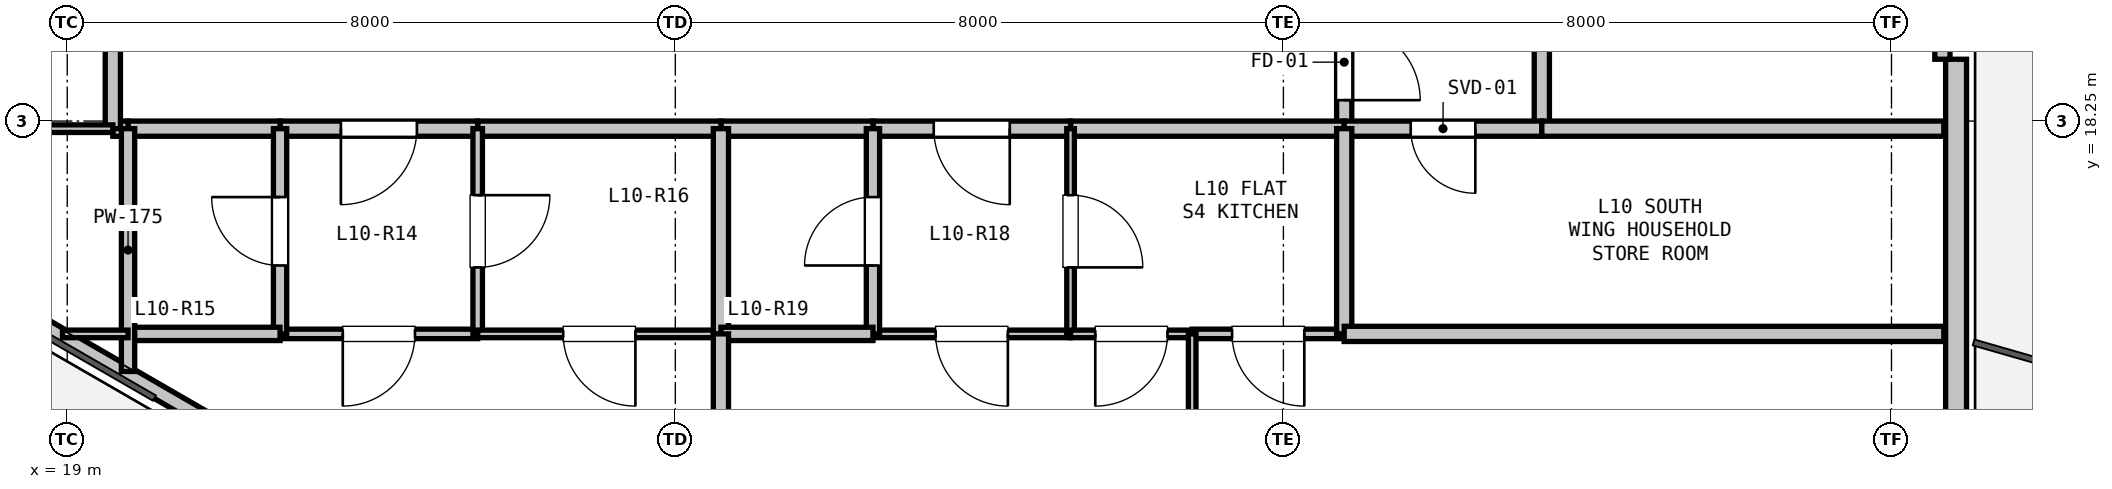
"""IFC4 building model, lengths in metres.
Left out: names, types, materials, properties, quantities, classifications, styles, units other than length and angle.
Written with IfcOpenShell. Run it as: python <this file> out.ifc"""

import sys

from ifc_helpers import new_model, si_unit, direction, frame, frame_2d, origin, place, context, subcontext, project, spatial, rectangle, extrude, element, fill, save


model = new_model("IFC4")
c1 = context("Model", 3, precision=1e-05, world=origin(), true_north=direction((0.0, 1.0)))
c2 = subcontext(c1, "Body", "Model", "MODEL_VIEW")
j1 = project(units=[si_unit("LENGTHUNIT", "METRE"), si_unit("PLANEANGLEUNIT", "RADIAN")], contexts=[c1])
p1 = place(None, origin())
s1 = spatial("IfcSite", under=j1, at=p1, CompositionType="ELEMENT")
p2 = place(p1, origin())
s2 = spatial("IfcBuilding", under=s1, at=p2, CompositionType="ELEMENT")
p3 = place(p2, frame((0.0, 0.0, 39.0)))
s3 = spatial("IfcBuildingStorey", under=s2, at=p3, CompositionType="ELEMENT", Elevation=39.0)
p4 = place(p3, frame((43.85, 19.063, 0.0), z_axis=(0.0, 0.0, 1.0), x_axis=(0.0, -1.0, 0.0)))
e1 = element("IfcWall", 1, at=p4, inside=s3, PredefinedType="SOLIDWALL", context=c2, shape_type="SweptSolid", body=[
    extrude(rectangle(XDim=12.673, YDim=0.275, at=frame_2d((6.336, 0.0))), origin(), (0.0, 0.0, 1.0), 2.66),
])
p5 = place(p3, frame((43.67, 20.763, 0.0), z_axis=(0.0, 0.0, 1.0), x_axis=(0.0, -1.0, 0.0)))
e2 = element("IfcWall", 2, at=p5, inside=s3, PredefinedType="PARAPET", context=c2, shape_type="SweptSolid", body=[
    extrude(rectangle(XDim=1.7, YDim=0.2, at=frame_2d((0.85, 0.0))), origin(), (0.0, 0.0, 1.0), 2.66),
])
p6 = place(p3, frame((26.76, 10.896, 0.0), z_axis=(0.0, 0.0, 1.0), x_axis=(-0.866027351828, 0.499996625875, 0.0)))
e3 = element("IfcWall", 3, at=p6, inside=s3, PredefinedType="PARAPET", context=c2, shape_type="SweptSolid", body=[
    extrude(rectangle(XDim=11.973, YDim=0.2, at=frame_2d((5.987, 0.0))), origin(), (0.0, 0.0, 1.0), 0.2),
])
p7 = place(p3, frame((35.8, 19.9, 0.0), z_axis=(0.0, 0.0, 1.0), x_axis=(0.0, -1.0, 0.0)))
e4 = element("IfcWall", 4, at=p7, inside=s3, PredefinedType="PARTITIONING", context=c2, shape_type="SweptSolid", body=[
    extrude(rectangle(XDim=1.75, YDim=0.2, at=frame_2d((0.875, 0.0))), origin(), (0.0, 0.0, 1.0), 3.04),
])
p8 = place(p7, frame((0.375, 0.0, 0.0)))
e5 = element("IfcOpeningElement", 5, at=p8, cuts=e4, PredefinedType="OPENING", context=c2, shape_type="SweptSolid", body=[
    extrude(rectangle(XDim=1.0, YDim=2.15, at=frame_2d((0.5, 1.075))), frame((0.0, 0.11, 0.0), z_axis=(0.0, -1.0, 0.0), x_axis=(1.0, 0.0, 0.0)), (0.0, 0.0, 1.0), 0.22),
])
p9 = place(p3, frame((35.8, 18.15, 0.0), z_axis=(0.0, 0.0, 1.0), x_axis=(-1.0, 0.0, 0.0)))
e6 = element("IfcWall", 6, at=p9, inside=s3, PredefinedType="PARTITIONING", context=c2, shape_type="SweptSolid", body=[
    extrude(rectangle(XDim=3.6, YDim=0.2, at=frame_2d((1.8, 0.0))), origin(), (0.0, 0.0, 1.0), 3.04),
])
p10 = place(p3, frame((32.2, 18.15, 0.0), z_axis=(0.0, 0.0, 1.0), x_axis=(-1.0, 0.0, 0.0)))
e7 = element("IfcWall", 7, at=p10, inside=s3, PredefinedType="PARTITIONING", context=c2, shape_type="SweptSolid", body=[
    extrude(rectangle(XDim=2.6, YDim=0.2, at=frame_2d((1.3, 0.0))), origin(), (0.0, 0.0, 1.0), 3.04),
])
p11 = place(p10, frame((0.8, 0.0, 0.0)))
e8 = element("IfcOpeningElement", 8, at=p11, cuts=e7, PredefinedType="OPENING", context=c2, shape_type="SweptSolid", body=[
    extrude(rectangle(XDim=1.0, YDim=2.15, at=frame_2d((0.5, 1.075))), frame((0.0, 0.11, 0.0), z_axis=(0.0, -1.0, 0.0), x_axis=(1.0, 0.0, 0.0)), (0.0, 0.0, 1.0), 0.22),
])
p12 = place(p3, frame((29.6, 18.15, 0.0), z_axis=(0.0, 0.0, 1.0), x_axis=(-1.0, 0.0, 0.0)))
e9 = element("IfcWall", 9, at=p12, inside=s3, PredefinedType="PARTITIONING", context=c2, shape_type="SweptSolid", body=[
    extrude(rectangle(XDim=2.0, YDim=0.2, at=frame_2d((1.0, 0.0))), origin(), (0.0, 0.0, 1.0), 3.04),
])
p13 = place(p3, frame((27.6, 18.15, 0.0), z_axis=(0.0, 0.0, 1.0), x_axis=(-1.0, 0.0, 0.0)))
e10 = element("IfcWall", 10, at=p13, inside=s3, PredefinedType="PARTITIONING", context=c2, shape_type="SweptSolid", body=[
    extrude(rectangle(XDim=3.2, YDim=0.2, at=frame_2d((1.6, 0.0))), origin(), (0.0, 0.0, 1.0), 3.04),
])
p14 = place(p3, frame((24.4, 18.15, 0.0), z_axis=(0.0, 0.0, 1.0), x_axis=(-1.0, 0.0, 0.0)))
e11 = element("IfcWall", 11, at=p14, inside=s3, PredefinedType="PARTITIONING", context=c2, shape_type="SweptSolid", body=[
    extrude(rectangle(XDim=2.6, YDim=0.2, at=frame_2d((1.3, 0.0))), origin(), (0.0, 0.0, 1.0), 2.337),
])
p15 = place(p14, frame((0.8, 0.0, 0.0)))
e12 = element("IfcOpeningElement", 12, at=p15, cuts=e11, PredefinedType="OPENING", context=c2, shape_type="SweptSolid", body=[
    extrude(rectangle(XDim=1.0, YDim=2.15, at=frame_2d((0.5, 1.075))), frame((0.0, 0.11, 0.0), z_axis=(0.0, -1.0, 0.0), x_axis=(1.0, 0.0, 0.0)), (0.0, 0.0, 1.0), 0.22),
])
p16 = place(p3, frame((21.8, 18.15, 0.0), z_axis=(0.0, 0.0, 1.0), x_axis=(-1.0, 0.0, 0.0)))
e13 = element("IfcWall", 13, at=p16, inside=s3, PredefinedType="PARTITIONING", context=c2, shape_type="SweptSolid", body=[
    extrude(rectangle(XDim=2.0, YDim=0.2, at=frame_2d((1.0, 0.0))), origin(), (0.0, 0.0, 1.0), 3.04),
])
p17 = place(p3, frame((19.8, 18.15, 0.0), z_axis=(0.0, 0.0, 1.0), x_axis=(-1.0, 0.0, 0.0)))
e14 = element("IfcWall", 14, at=p17, inside=s3, PredefinedType="PARTITIONING", context=c2, shape_type="SweptSolid", body=[
    extrude(rectangle(XDim=0.2, YDim=0.2, at=frame_2d((0.1, 0.0))), origin(), (0.0, 0.0, 1.0), 3.04),
])
p18 = place(p3, frame((19.6, 18.15, 0.0), z_axis=(0.0, 0.0, 1.0), x_axis=(0.0, 1.0, 0.0)))
e15 = element("IfcWall", 15, at=p18, inside=s3, PredefinedType="PARTITIONING", context=c2, shape_type="SweptSolid", body=[
    extrude(rectangle(XDim=3.9, YDim=0.2, at=frame_2d((1.95, 0.0))), origin(), (0.0, 0.0, 1.0), 2.337),
])
p19 = place(p3, frame((38.4, 21.4, 0.0), z_axis=(0.0, 0.0, 1.0), x_axis=(0.0, -1.0, 0.0)))
e16 = element("IfcWall", 16, at=p19, inside=s3, PredefinedType="PARTITIONING", context=c2, shape_type="SweptSolid", body=[
    extrude(rectangle(XDim=3.25, YDim=0.2, at=frame_2d((1.625, 0.0))), origin(), (0.0, 0.0, 1.0), 3.04),
])
p20 = place(p3, frame((38.4, 18.15, 0.0), z_axis=(0.0, 0.0, 1.0), x_axis=(-1.0, 0.0, 0.0)))
e17 = element("IfcWall", 17, at=p20, inside=s3, PredefinedType="PARTITIONING", context=c2, shape_type="SweptSolid", body=[
    extrude(rectangle(XDim=2.6, YDim=0.2, at=frame_2d((1.3, 0.0))), origin(), (0.0, 0.0, 1.0), 2.337),
])
p21 = place(p20, frame((0.875, 0.0, 0.0)))
e18 = element("IfcOpeningElement", 18, at=p21, cuts=e17, PredefinedType="OPENING", context=c2, shape_type="SweptSolid", body=[
    extrude(rectangle(XDim=0.85, YDim=2.1, at=frame_2d((0.425, 1.05))), frame((0.0, 0.11, 0.0), z_axis=(0.0, -1.0, 0.0), x_axis=(1.0, 0.0, 0.0)), (0.0, 0.0, 1.0), 0.22),
])
p22 = place(p3, frame((24.4, 15.45, 0.0), z_axis=(0.0, 0.0, 1.0), x_axis=(-1.0, 0.0, 0.0)))
e19 = element("IfcWall", 19, at=p22, inside=s3, PredefinedType="PARTITIONING", context=c2, shape_type="SweptSolid", body=[
    extrude(rectangle(XDim=2.6, YDim=0.125, at=frame_2d((1.3, 0.0))), origin(), (0.0, 0.0, 1.0), 3.04),
])
p23 = place(p22, frame((0.825, 0.0, 0.0)))
e20 = element("IfcOpeningElement", 20, at=p23, cuts=e19, PredefinedType="OPENING", context=c2, shape_type="SweptSolid", body=[
    extrude(rectangle(XDim=0.95, YDim=2.1, at=frame_2d((0.475, 1.05))), frame((0.0, 0.073, 0.0), z_axis=(0.0, -1.0, 0.0), x_axis=(1.0, 0.0, 0.0)), (0.0, 0.0, 1.0), 0.145),
])
p24 = place(p3, frame((21.8, 15.45, 0.0), z_axis=(0.0, 0.0, 1.0), x_axis=(0.0, 1.0, 0.0)))
e21 = element("IfcWall", 21, at=p24, inside=s3, PredefinedType="PLUMBINGWALL", context=c2, shape_type="SweptSolid", body=[
    extrude(rectangle(XDim=2.7, YDim=0.175, at=frame_2d((1.35, 0.0))), origin(), (0.0, 0.0, 1.0), 3.04),
])
p25 = place(p24, frame((0.9, 0.0, 0.0)))
e22 = element("IfcOpeningElement", 22, at=p25, cuts=e21, PredefinedType="OPENING", context=c2, shape_type="SweptSolid", body=[
    extrude(rectangle(XDim=0.9, YDim=2.1, at=frame_2d((0.45, 1.05))), frame((0.0, 0.097, 0.0), z_axis=(0.0, -1.0, 0.0), x_axis=(1.0, 0.0, 0.0)), (0.0, 0.0, 1.0), 0.195),
])
p26 = place(p3, frame((24.4, 18.15, 0.0), z_axis=(0.0, 0.0, 1.0), x_axis=(0.0, -1.0, 0.0)))
e23 = element("IfcWall", 23, at=p26, inside=s3, PredefinedType="PARTITIONING", context=c2, shape_type="SweptSolid", body=[
    extrude(rectangle(XDim=2.7, YDim=0.125, at=frame_2d((1.35, 0.0))), origin(), (0.0, 0.0, 1.0), 2.337),
])
p27 = place(p26, frame((0.875, 0.0, 0.0)))
e24 = element("IfcOpeningElement", 24, at=p27, cuts=e23, PredefinedType="OPENING", context=c2, shape_type="SweptSolid", body=[
    extrude(rectangle(XDim=0.95, YDim=2.1, at=frame_2d((0.475, 1.05))), frame((0.0, 0.073, 0.0), z_axis=(0.0, -1.0, 0.0), x_axis=(1.0, 0.0, 0.0)), (0.0, 0.0, 1.0), 0.145),
])
p28 = place(p3, frame((32.2, 15.45, 0.0), z_axis=(0.0, 0.0, 1.0), x_axis=(-1.0, 0.0, 0.0)))
e25 = element("IfcWall", 25, at=p28, inside=s3, PredefinedType="PARTITIONING", context=c2, shape_type="SweptSolid", body=[
    extrude(rectangle(XDim=2.6, YDim=0.1, at=frame_2d((1.3, 0.0))), origin(), (0.0, 0.0, 1.0), 3.04),
])
p29 = place(p28, frame((0.825, 0.0, 0.0)))
e26 = element("IfcOpeningElement", 26, at=p29, cuts=e25, PredefinedType="OPENING", context=c2, shape_type="SweptSolid", body=[
    extrude(rectangle(XDim=0.95, YDim=2.1, at=frame_2d((0.475, 1.05))), frame((0.0, 0.06, 0.0), z_axis=(0.0, -1.0, 0.0), x_axis=(1.0, 0.0, 0.0)), (0.0, 0.0, 1.0), 0.12),
])
p30 = place(p3, frame((29.6, 15.45, 0.0), z_axis=(0.0, 0.0, 1.0), x_axis=(0.0, 1.0, 0.0)))
e27 = element("IfcWall", 27, at=p30, inside=s3, PredefinedType="PLUMBINGWALL", context=c2, shape_type="SweptSolid", body=[
    extrude(rectangle(XDim=2.7, YDim=0.175, at=frame_2d((1.35, 0.0))), origin(), (0.0, 0.0, 1.0), 3.04),
])
p31 = place(p30, frame((0.9, 0.0, 0.0)))
e28 = element("IfcOpeningElement", 28, at=p31, cuts=e27, PredefinedType="OPENING", context=c2, shape_type="SweptSolid", body=[
    extrude(rectangle(XDim=0.9, YDim=2.1, at=frame_2d((0.45, 1.05))), frame((0.0, 0.097, 0.0), z_axis=(0.0, -1.0, 0.0), x_axis=(1.0, 0.0, 0.0)), (0.0, 0.0, 1.0), 0.195),
])
p32 = place(p3, frame((32.2, 18.15, 0.0), z_axis=(0.0, 0.0, 1.0), x_axis=(0.0, -1.0, 0.0)))
e29 = element("IfcWall", 29, at=p32, inside=s3, PredefinedType="PARTITIONING", context=c2, shape_type="SweptSolid", body=[
    extrude(rectangle(XDim=2.7, YDim=0.1, at=frame_2d((1.35, 0.0))), origin(), (0.0, 0.0, 1.0), 3.04),
])
p33 = place(p32, frame((0.875, 0.0, 0.0)))
e30 = element("IfcOpeningElement", 30, at=p33, cuts=e29, PredefinedType="OPENING", context=c2, shape_type="SweptSolid", body=[
    extrude(rectangle(XDim=0.95, YDim=2.1, at=frame_2d((0.475, 1.05))), frame((0.0, 0.06, 0.0), z_axis=(0.0, -1.0, 0.0), x_axis=(1.0, 0.0, 0.0)), (0.0, 0.0, 1.0), 0.12),
])
p34 = place(p3, frame((21.8, 15.45, 0.0), z_axis=(0.0, 0.0, 1.0), x_axis=(-1.0, 0.0, 0.0)))
e31 = element("IfcWall", 31, at=p34, inside=s3, PredefinedType="PLUMBINGWALL", context=c2, shape_type="SweptSolid", body=[
    extrude(rectangle(XDim=2.0, YDim=0.175, at=frame_2d((1.0, 0.0))), origin(), (0.0, 0.0, 1.0), 2.365),
])
p35 = place(p3, frame((19.8, 14.956, 0.0), z_axis=(0.0, 0.0, 1.0), x_axis=(0.0, 1.0, 0.0)))
e32 = element("IfcWall", 32, at=p35, inside=s3, PredefinedType="PLUMBINGWALL", context=c2, shape_type="SweptSolid", body=[
    extrude(rectangle(XDim=3.194, YDim=0.175, at=frame_2d((1.597, 0.0))), origin(), (0.0, 0.0, 1.0), 2.365),
])
p36 = place(p3, frame((27.6, 15.45, 0.0), z_axis=(0.0, 0.0, 1.0), x_axis=(-1.0, 0.0, 0.0)))
e33 = element("IfcWall", 33, at=p36, inside=s3, PredefinedType="PARTITIONING", context=c2, shape_type="SweptSolid", body=[
    extrude(rectangle(XDim=3.2, YDim=0.1, at=frame_2d((1.6, 0.0))), origin(), (0.0, 0.0, 1.0), 2.337),
])
p37 = place(p36, frame((1.125, 0.0, 0.0)))
e34 = element("IfcOpeningElement", 34, at=p37, cuts=e33, PredefinedType="OPENING", context=c2, shape_type="SweptSolid", body=[
    extrude(rectangle(XDim=0.95, YDim=2.1, at=frame_2d((0.475, 1.05))), frame((0.0, 0.06, 0.0), z_axis=(0.0, -1.0, 0.0), x_axis=(1.0, 0.0, 0.0)), (0.0, 0.0, 1.0), 0.12),
])
p38 = place(p3, frame((27.6, 18.15, 0.0), z_axis=(0.0, 0.0, 1.0), x_axis=(0.0, -1.0, 0.0)))
e35 = element("IfcWall", 35, at=p38, inside=s3, PredefinedType="PARTITIONING", context=c2, shape_type="SweptSolid", body=[
    extrude(rectangle(XDim=2.7, YDim=0.2, at=frame_2d((1.35, 0.0))), origin(), (0.0, 0.0, 1.0), 3.04),
])
p39 = place(p3, frame((29.6, 15.45, 0.0), z_axis=(0.0, 0.0, 1.0), x_axis=(-1.0, 0.0, 0.0)))
e36 = element("IfcWall", 36, at=p39, inside=s3, PredefinedType="PLUMBINGWALL", context=c2, shape_type="SweptSolid", body=[
    extrude(rectangle(XDim=2.0, YDim=0.175, at=frame_2d((1.0, 0.0))), origin(), (0.0, 0.0, 1.0), 3.04),
])
p40 = place(p3, frame((35.8, 15.45, 0.0), z_axis=(0.0, 0.0, 1.0), x_axis=(-1.0, 0.0, 0.0)))
e37 = element("IfcWall", 37, at=p40, inside=s3, PredefinedType="PARTITIONING", context=c2, shape_type="SweptSolid", body=[
    extrude(rectangle(XDim=2.0, YDim=0.125, at=frame_2d((1.0, 0.0))), origin(), (0.0, 0.0, 1.0), 3.04),
])
p41 = place(p40, frame((0.525, 0.0, 0.0)))
e38 = element("IfcOpeningElement", 38, at=p41, cuts=e37, PredefinedType="OPENING", context=c2, shape_type="SweptSolid", body=[
    extrude(rectangle(XDim=0.95, YDim=2.1, at=frame_2d((0.475, 1.05))), frame((0.0, 0.073, 0.0), z_axis=(0.0, -1.0, 0.0), x_axis=(1.0, 0.0, 0.0)), (0.0, 0.0, 1.0), 0.145),
])
p42 = place(p3, frame((33.8, 15.45, 0.0), z_axis=(0.0, 0.0, 1.0), x_axis=(-1.0, 0.0, 0.0)))
e39 = element("IfcWall", 39, at=p42, inside=s3, PredefinedType="PARTITIONING", context=c2, shape_type="SweptSolid", body=[
    extrude(rectangle(XDim=1.6, YDim=0.1, at=frame_2d((0.8, 0.0))), origin(), (0.0, 0.0, 1.0), 3.04),
])
p43 = place(p42, frame((0.325, 0.0, 0.0)))
e40 = element("IfcOpeningElement", 40, at=p43, cuts=e39, PredefinedType="OPENING", context=c2, shape_type="SweptSolid", body=[
    extrude(rectangle(XDim=0.95, YDim=2.1, at=frame_2d((0.475, 1.05))), frame((0.0, 0.06, 0.0), z_axis=(0.0, -1.0, 0.0), x_axis=(1.0, 0.0, 0.0)), (0.0, 0.0, 1.0), 0.12),
])
p44 = place(p3, frame((35.8, 18.15, 0.0), z_axis=(0.0, 0.0, 1.0), x_axis=(0.0, -1.0, 0.0)))
e41 = element("IfcWall", 41, at=p44, inside=s3, PredefinedType="PARTITIONING", context=c2, shape_type="SweptSolid", body=[
    extrude(rectangle(XDim=2.7, YDim=0.2, at=frame_2d((1.35, 0.0))), origin(), (0.0, 0.0, 1.0), 3.04),
])
p45 = place(p3, frame((19.6, 18.15, 0.0), z_axis=(0.0, 0.0, 1.0), x_axis=(-1.0, 0.0, 0.0)))
e42 = element("IfcWall", 42, at=p45, inside=s3, PredefinedType="PARTITIONING", context=c2, shape_type="SweptSolid", body=[
    extrude(rectangle(XDim=2.45, YDim=0.1, at=frame_2d((1.225, 0.0))), origin(), (0.0, 0.0, 1.0), 3.04),
])
p46 = place(p3, frame((43.688, 18.15, 0.0), z_axis=(0.0, 0.0, 1.0), x_axis=(-1.0, 0.0, 0.0)))
e43 = element("IfcWall", 43, at=p46, inside=s3, PredefinedType="PARTITIONING", context=c2, shape_type="SweptSolid", body=[
    extrude(rectangle(XDim=5.289, YDim=0.2, at=frame_2d((2.644, 0.0))), origin(), (0.0, 0.0, 1.0), 2.365),
])
p47 = place(p3, frame((43.688, 15.45, 0.0), z_axis=(0.0, 0.0, 1.0), x_axis=(-1.0, 0.0, 0.0)))
e44 = element("IfcWall", 44, at=p47, inside=s3, PredefinedType="PARTITIONING", context=c2, shape_type="SweptSolid", body=[
    extrude(rectangle(XDim=7.888, YDim=0.2, at=frame_2d((3.944, 0.0))), origin(), (0.0, 0.0, 1.0), 2.337),
])
p48 = place(p3, frame((18.938, 15.45, 0.0), z_axis=(0.0, 0.0, 1.0), x_axis=(1.0, 0.0, 0.0)))
e45 = element("IfcWall", 45, at=p48, inside=s3, PredefinedType="PARTITIONING", context=c2, shape_type="SweptSolid", body=[
    extrude(rectangle(XDim=0.863, YDim=0.1, at=frame_2d((0.431, 0.0))), origin(), (0.0, 0.0, 1.0), 2.65),
])
p49 = place(p3, frame((27.6, 15.45, 0.0), z_axis=(0.0, 0.0, 1.0), x_axis=(0.0, -1.0, 0.0)))
e46 = element("IfcWall", 46, at=p49, inside=s3, PredefinedType="PARTITIONING", context=c2, shape_type="SweptSolid", body=[
    extrude(rectangle(XDim=4.688, YDim=0.2, at=frame_2d((2.344, 0.0))), origin(), (0.0, 0.0, 1.0), 2.337),
])
p50 = place(p3, frame((33.8, 15.45, 0.0), z_axis=(0.0, 0.0, 1.0), x_axis=(0.0, -1.0, 0.0)))
e47 = element("IfcWall", 47, at=p50, inside=s3, PredefinedType="PARTITIONING", context=c2, shape_type="SweptSolid", body=[
    extrude(rectangle(XDim=5.91, YDim=0.1, at=frame_2d((2.955, 0.0))), origin(), (0.0, 0.0, 1.0), 3.04),
])
p51 = place(p50, frame((2.48, 0.0, 0.0)))
e48 = element("IfcOpeningElement", 48, at=p51, cuts=e47, PredefinedType="OPENING", context=c2, shape_type="SweptSolid", body=[
    extrude(rectangle(XDim=0.95, YDim=2.1, at=frame_2d((0.475, 1.05))), frame((0.0, 0.06, 0.0), z_axis=(0.0, -1.0, 0.0), x_axis=(1.0, 0.0, 0.0)), (0.0, 0.0, 1.0), 0.12),
])
p52 = place(p8, origin())
e49 = element("IfcDoor", 49, at=p52, inside=s3, OperationType="SINGLE_SWING_RIGHT", PredefinedType="DOOR", context=c2, shape_type="SweptSolid", body=[
    extrude(rectangle(XDim=1.0, YDim=2.15, at=frame_2d((0.5, 1.075))), frame((0.0, 0.025, 0.0), z_axis=(0.0, -1.0, 0.0), x_axis=(1.0, 0.0, 0.0)), (0.0, 0.0, 1.0), 0.05),
])
fill(e5, e49)
p53 = place(p15, origin())
e50 = element("IfcDoor", 50, at=p53, inside=s3, OperationType="SINGLE_SWING_RIGHT", PredefinedType="DOOR", context=c2, shape_type="SweptSolid", body=[
    extrude(rectangle(XDim=1.0, YDim=2.15, at=frame_2d((0.5, 1.075))), frame((0.0, 0.025, 0.0), z_axis=(0.0, -1.0, 0.0), x_axis=(1.0, 0.0, 0.0)), (0.0, 0.0, 1.0), 0.05),
])
fill(e12, e50)
p54 = place(p11, origin())
e51 = element("IfcDoor", 51, at=p54, inside=s3, OperationType="SINGLE_SWING_LEFT", PredefinedType="DOOR", context=c2, shape_type="SweptSolid", body=[
    extrude(rectangle(XDim=1.0, YDim=2.15, at=frame_2d((0.5, 1.075))), frame((0.0, 0.025, 0.0), z_axis=(0.0, -1.0, 0.0), x_axis=(1.0, 0.0, 0.0)), (0.0, 0.0, 1.0), 0.05),
])
fill(e8, e51)
p55 = place(p21, origin())
e52 = element("IfcDoor", 52, at=p55, inside=s3, OperationType="SINGLE_SWING_LEFT", PredefinedType="DOOR", context=c2, shape_type="SweptSolid", body=[
    extrude(rectangle(XDim=0.85, YDim=2.1, at=frame_2d((0.425, 1.05))), frame((0.0, 0.025, 0.0), z_axis=(0.0, -1.0, 0.0), x_axis=(1.0, 0.0, 0.0)), (0.0, 0.0, 1.0), 0.05),
])
fill(e18, e52)
p56 = place(p25, origin())
e53 = element("IfcDoor", 53, at=p56, inside=s3, OperationType="SINGLE_SWING_RIGHT", PredefinedType="DOOR", context=c2, shape_type="SweptSolid", body=[
    extrude(rectangle(XDim=0.9, YDim=2.1, at=frame_2d((0.45, 1.05))), frame((0.0, 0.025, 0.0), z_axis=(0.0, -1.0, 0.0), x_axis=(1.0, 0.0, 0.0)), (0.0, 0.0, 1.0), 0.05),
])
fill(e22, e53)
p57 = place(p27, origin())
e54 = element("IfcDoor", 54, at=p57, inside=s3, OperationType="SINGLE_SWING_LEFT", PredefinedType="DOOR", context=c2, shape_type="SweptSolid", body=[
    extrude(rectangle(XDim=0.95, YDim=2.1, at=frame_2d((0.475, 1.05))), frame((0.0, 0.025, 0.0), z_axis=(0.0, -1.0, 0.0), x_axis=(1.0, 0.0, 0.0)), (0.0, 0.0, 1.0), 0.05),
])
fill(e24, e54)
p58 = place(p23, origin())
e55 = element("IfcDoor", 55, at=p58, inside=s3, OperationType="SINGLE_SWING_RIGHT", PredefinedType="DOOR", context=c2, shape_type="SweptSolid", body=[
    extrude(rectangle(XDim=0.95, YDim=2.1, at=frame_2d((0.475, 1.05))), frame((0.0, 0.025, 0.0), z_axis=(0.0, -1.0, 0.0), x_axis=(1.0, 0.0, 0.0)), (0.0, 0.0, 1.0), 0.05),
])
fill(e20, e55)
p59 = place(p31, origin())
e56 = element("IfcDoor", 56, at=p59, inside=s3, OperationType="SINGLE_SWING_LEFT", PredefinedType="DOOR", context=c2, shape_type="SweptSolid", body=[
    extrude(rectangle(XDim=0.9, YDim=2.1, at=frame_2d((0.45, 1.05))), frame((0.0, 0.025, 0.0), z_axis=(0.0, -1.0, 0.0), x_axis=(1.0, 0.0, 0.0)), (0.0, 0.0, 1.0), 0.05),
])
fill(e28, e56)
p60 = place(p33, origin())
e57 = element("IfcDoor", 57, at=p60, inside=s3, OperationType="SINGLE_SWING_RIGHT", PredefinedType="DOOR", context=c2, shape_type="SweptSolid", body=[
    extrude(rectangle(XDim=0.95, YDim=2.1, at=frame_2d((0.475, 1.05))), frame((0.0, 0.025, 0.0), z_axis=(0.0, -1.0, 0.0), x_axis=(1.0, 0.0, 0.0)), (0.0, 0.0, 1.0), 0.05),
])
fill(e30, e57)
p61 = place(p29, origin())
e58 = element("IfcDoor", 58, at=p61, inside=s3, OperationType="SINGLE_SWING_LEFT", PredefinedType="DOOR", context=c2, shape_type="SweptSolid", body=[
    extrude(rectangle(XDim=0.95, YDim=2.1, at=frame_2d((0.475, 1.05))), frame((0.0, 0.025, 0.0), z_axis=(0.0, -1.0, 0.0), x_axis=(1.0, 0.0, 0.0)), (0.0, 0.0, 1.0), 0.05),
])
fill(e26, e58)
p62 = place(p37, origin())
e59 = element("IfcDoor", 59, at=p62, inside=s3, OperationType="SINGLE_SWING_LEFT", PredefinedType="DOOR", context=c2, shape_type="SweptSolid", body=[
    extrude(rectangle(XDim=0.95, YDim=2.1, at=frame_2d((0.475, 1.05))), frame((0.0, 0.025, 0.0), z_axis=(0.0, -1.0, 0.0), x_axis=(1.0, 0.0, 0.0)), (0.0, 0.0, 1.0), 0.05),
])
fill(e34, e59)
p63 = place(p43, origin())
e60 = element("IfcDoor", 60, at=p63, inside=s3, OperationType="SINGLE_SWING_RIGHT", PredefinedType="DOOR", context=c2, shape_type="SweptSolid", body=[
    extrude(rectangle(XDim=0.95, YDim=2.1, at=frame_2d((0.475, 1.05))), frame((0.0, 0.025, 0.0), z_axis=(0.0, -1.0, 0.0), x_axis=(1.0, 0.0, 0.0)), (0.0, 0.0, 1.0), 0.05),
])
fill(e40, e60)
p64 = place(p41, origin())
e61 = element("IfcDoor", 61, at=p64, inside=s3, OperationType="SINGLE_SWING_LEFT", PredefinedType="DOOR", context=c2, shape_type="SweptSolid", body=[
    extrude(rectangle(XDim=0.95, YDim=2.1, at=frame_2d((0.475, 1.05))), frame((0.0, 0.025, 0.0), z_axis=(0.0, -1.0, 0.0), x_axis=(1.0, 0.0, 0.0)), (0.0, 0.0, 1.0), 0.05),
])
fill(e38, e61)
save(model, sys.argv[1])
